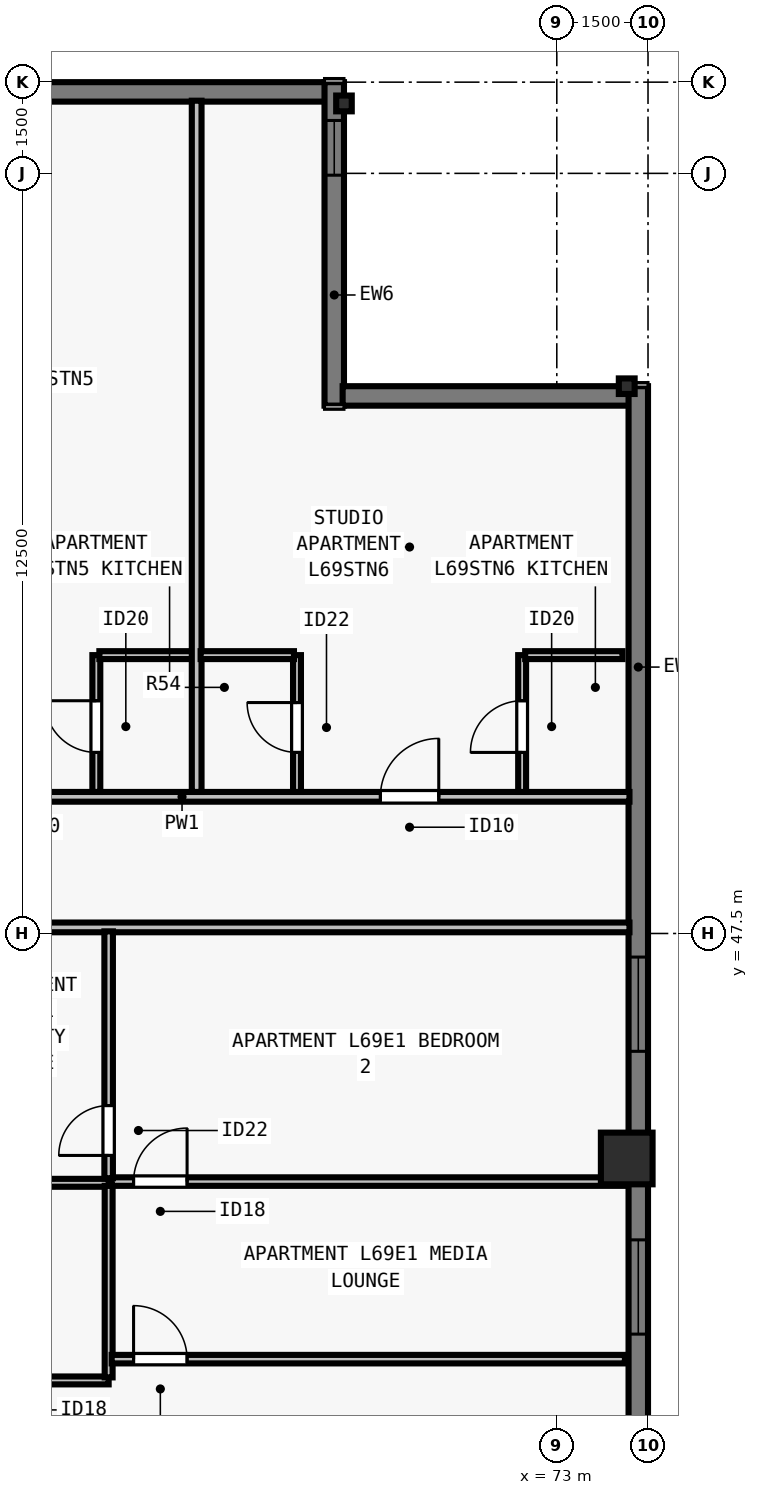
"""IFC4 building model, lengths in metres.
Left out: names, types, materials, properties, quantities, classifications, styles, units other than length and angle.
Written with IfcOpenShell. Run it as: python <this file> out.ifc"""

import sys

from ifc_helpers import new_model, si_unit, direction, frame, frame_2d, origin, origin_2d, place, context, subcontext, project, spatial, rectangle, i_section, extrude, element, fill, save


model = new_model("IFC4")
c1 = context("Model", 3, precision=1e-05, world=origin(), true_north=direction((0.0, 1.0)))
c2 = subcontext(c1, "Body", "Model", "MODEL_VIEW")
j1 = project(units=[si_unit("LENGTHUNIT", "METRE"), si_unit("PLANEANGLEUNIT", "RADIAN")], contexts=[c1])
p1 = place(None, origin())
s1 = spatial("IfcSite", under=j1, at=p1, CompositionType="ELEMENT")
p2 = place(p1, origin())
s2 = spatial("IfcBuilding", under=s1, at=p2, CompositionType="ELEMENT")
p3 = place(p2, frame((0.0, 0.0, 251.5)))
s3 = spatial("IfcBuildingStorey", under=s2, at=p3, CompositionType="ELEMENT", Elevation=251.5)
p4 = place(p3, frame((74.15, 43.8, 0.0), z_axis=(0.0, 0.0, 1.0), x_axis=(0.0, 1.0, 0.0)))
e1 = element("IfcColumn", 1, at=p4, inside=s3, PredefinedType="COLUMN", context=c2, shape_type="SweptSolid", body=[
    extrude(rectangle(XDim=0.85, YDim=0.85, at=origin_2d()), origin(), (0.0, 0.0, 1.0), 3.5),
])
for number, where, z_axis, x_axis in (
    (2, (74.15, 56.5, 0.0), (0.0, 0.0, 1.0), (0.0, 1.0, 0.0)),
    (3, (69.5, 61.15, 0.0), (0.0, 0.0, 1.0), (1.0, 0.0, 0.0)),
):
    element("IfcColumn", number, at=place(p3, frame(where, z_axis=z_axis, x_axis=x_axis)), inside=s3, PredefinedType="COLUMN", context=c2, shape_type="SweptSolid", body=[
        extrude(i_section(OverallWidth=0.256, OverallDepth=0.26, WebThickness=0.01, FlangeThickness=0.017, FilletRadius=0.013, at=origin_2d()), origin(), (0.0, 0.0, 1.0), 3.5),
    ])
p5 = place(p3, frame((34.5, 61.34, 0.0), z_axis=(0.0, 0.0, 1.0), x_axis=(1.0, 0.0, 0.0)))
e4 = element("IfcWall", 4, at=p5, inside=s3, PredefinedType="SOLIDWALL", context=c2, shape_type="SweptSolid", body=[
    extrude(rectangle(XDim=34.702, YDim=0.32, at=frame_2d((17.351, 0.0))), origin(), (0.0, 0.0, 1.0), 3.29),
])
p6 = place(p5, frame((4.613, 0.0, 0.8)))
e5 = element("IfcOpeningElement", 5, at=p6, cuts=e4, PredefinedType="OPENING", context=c2, shape_type="SweptSolid", body=[
    extrude(rectangle(XDim=1.85, YDim=1.678, at=frame_2d((0.925, 0.839))), frame((0.0, 0.17, 0.0), z_axis=(0.0, -1.0, 0.0), x_axis=(1.0, 0.0, 0.0)), (0.0, 0.0, 1.0), 0.34),
])
p7 = place(p5, frame((7.688, 0.0, 0.8)))
e6 = element("IfcOpeningElement", 6, at=p7, cuts=e4, PredefinedType="OPENING", context=c2, shape_type="SweptSolid", body=[
    extrude(rectangle(XDim=1.55, YDim=1.678, at=frame_2d((0.775, 0.839))), frame((0.0, 0.17, 0.0), z_axis=(0.0, -1.0, 0.0), x_axis=(1.0, 0.0, 0.0)), (0.0, 0.0, 1.0), 0.34),
])
p8 = place(p5, frame((14.888, 0.0, 0.8)))
e7 = element("IfcOpeningElement", 7, at=p8, cuts=e4, PredefinedType="OPENING", context=c2, shape_type="SweptSolid", body=[
    extrude(rectangle(XDim=1.55, YDim=1.678, at=frame_2d((0.775, 0.839))), frame((0.0, 0.17, 0.0), z_axis=(0.0, -1.0, 0.0), x_axis=(1.0, 0.0, 0.0)), (0.0, 0.0, 1.0), 0.34),
])
p9 = place(p5, frame((18.564, 0.0, 0.8)))
e8 = element("IfcOpeningElement", 8, at=p9, cuts=e4, PredefinedType="OPENING", context=c2, shape_type="SweptSolid", body=[
    extrude(rectangle(XDim=1.85, YDim=1.678, at=frame_2d((0.925, 0.839))), frame((0.0, 0.17, 0.0), z_axis=(0.0, -1.0, 0.0), x_axis=(1.0, 0.0, 0.0)), (0.0, 0.0, 1.0), 0.34),
])
p10 = place(p5, frame((25.314, 0.0, 0.8)))
e9 = element("IfcOpeningElement", 9, at=p10, cuts=e4, PredefinedType="OPENING", context=c2, shape_type="SweptSolid", body=[
    extrude(rectangle(XDim=1.85, YDim=1.678, at=frame_2d((0.925, 0.839))), frame((0.0, 0.17, 0.0), z_axis=(0.0, -1.0, 0.0), x_axis=(1.0, 0.0, 0.0)), (0.0, 0.0, 1.0), 0.34),
])
p11 = place(p5, frame((28.389, 0.0, 0.8)))
e10 = element("IfcOpeningElement", 10, at=p11, cuts=e4, PredefinedType="OPENING", context=c2, shape_type="SweptSolid", body=[
    extrude(rectangle(XDim=1.55, YDim=1.678, at=frame_2d((0.775, 0.839))), frame((0.0, 0.17, 0.0), z_axis=(0.0, -1.0, 0.0), x_axis=(1.0, 0.0, 0.0)), (0.0, 0.0, 1.0), 0.34),
])
p12 = place(p3, frame((69.34, 61.5, 0.0), z_axis=(0.0, 0.0, 1.0), x_axis=(0.0, -1.0, 0.0)))
e11 = element("IfcWall", 11, at=p12, inside=s3, PredefinedType="SOLIDWALL", context=c2, shape_type="SweptSolid", body=[
    extrude(rectangle(XDim=5.32, YDim=0.32, at=frame_2d((2.66, 0.0))), origin(), (0.0, 0.0, 1.0), 3.29),
])
p13 = place(p12, frame((0.63, 0.0, 0.8)))
e12 = element("IfcOpeningElement", 12, at=p13, cuts=e11, PredefinedType="OPENING", context=c2, shape_type="SweptSolid", body=[
    extrude(rectangle(XDim=0.9, YDim=1.678, at=frame_2d((0.45, 0.839))), frame((0.0, 0.17, 0.0), z_axis=(0.0, -1.0, 0.0), x_axis=(1.0, 0.0, 0.0)), (0.0, 0.0, 1.0), 0.34),
])
p14 = place(p3, frame((69.478, 56.34, 0.0), z_axis=(0.0, 0.0, 1.0), x_axis=(1.0, 0.0, 0.0)))
e13 = element("IfcWall", 13, at=p14, inside=s3, PredefinedType="SOLIDWALL", context=c2, shape_type="SweptSolid", body=[
    extrude(rectangle(XDim=4.724, YDim=0.32, at=frame_2d((2.362, 0.0))), origin(), (0.0, 0.0, 1.0), 3.29),
])
p15 = place(p3, frame((74.34, 56.5, 0.0), z_axis=(0.0, 0.0, 1.0), x_axis=(0.0, -1.0, 0.0)))
e14 = element("IfcWall", 14, at=p15, inside=s3, PredefinedType="SOLIDWALL", context=c2, shape_type="SweptSolid", body=[
    extrude(rectangle(XDim=34.702, YDim=0.32, at=frame_2d((17.351, 0.0))), origin(), (0.0, 0.0, 1.0), 3.29),
])
p16 = place(p15, frame((9.388, 0.0, 0.8)))
e15 = element("IfcOpeningElement", 15, at=p16, cuts=e14, PredefinedType="OPENING", context=c2, shape_type="SweptSolid", body=[
    extrude(rectangle(XDim=1.55, YDim=1.678, at=frame_2d((0.775, 0.839))), frame((0.0, 0.17, 0.0), z_axis=(0.0, -1.0, 0.0), x_axis=(1.0, 0.0, 0.0)), (0.0, 0.0, 1.0), 0.34),
])
p17 = place(p15, frame((14.038, 0.0, 0.8)))
e16 = element("IfcOpeningElement", 16, at=p17, cuts=e14, PredefinedType="OPENING", context=c2, shape_type="SweptSolid", body=[
    extrude(rectangle(XDim=1.55, YDim=1.678, at=frame_2d((0.775, 0.839))), frame((0.0, 0.17, 0.0), z_axis=(0.0, -1.0, 0.0), x_axis=(1.0, 0.0, 0.0)), (0.0, 0.0, 1.0), 0.34),
])
p18 = place(p15, frame((18.114, 0.0, 0.8)))
e17 = element("IfcOpeningElement", 17, at=p18, cuts=e14, PredefinedType="OPENING", context=c2, shape_type="SweptSolid", body=[
    extrude(rectangle(XDim=1.85, YDim=1.678, at=frame_2d((0.925, 0.839))), frame((0.0, 0.17, 0.0), z_axis=(0.0, -1.0, 0.0), x_axis=(1.0, 0.0, 0.0)), (0.0, 0.0, 1.0), 0.34),
])
p19 = place(p15, frame((23.614, 0.0, 0.8)))
e18 = element("IfcOpeningElement", 18, at=p19, cuts=e14, PredefinedType="OPENING", context=c2, shape_type="SweptSolid", body=[
    extrude(rectangle(XDim=1.85, YDim=1.678, at=frame_2d((0.925, 0.839))), frame((0.0, 0.17, 0.0), z_axis=(0.0, -1.0, 0.0), x_axis=(1.0, 0.0, 0.0)), (0.0, 0.0, 1.0), 0.34),
])
p20 = place(p15, frame((30.95, 0.0, 0.8)))
e19 = element("IfcOpeningElement", 19, at=p20, cuts=e14, PredefinedType="OPENING", context=c2, shape_type="SweptSolid", body=[
    extrude(rectangle(XDim=0.9, YDim=1.678, at=frame_2d((0.45, 0.839))), frame((0.0, 0.17, 0.0), z_axis=(0.0, -1.0, 0.0), x_axis=(1.0, 0.0, 0.0)), (0.0, 0.0, 1.0), 0.34),
])
p21 = place(p3, frame((29.805, 49.748, 0.0), z_axis=(0.0, 0.0, 1.0), x_axis=(1.0, 0.0, 0.0)))
e20 = element("IfcWall", 20, at=p21, inside=s3, PredefinedType="PARTITIONING", context=c2, shape_type="SweptSolid", body=[
    extrude(rectangle(XDim=44.39, YDim=0.16, at=frame_2d((22.195, 0.0))), origin(), (0.0, 0.0, 1.0), 2.958),
])
p22 = place(p21, frame((3.494, 0.0, 0.0)))
e21 = element("IfcOpeningElement", 21, at=p22, cuts=e20, PredefinedType="OPENING", context=c2, shape_type="SweptSolid", body=[
    extrude(rectangle(XDim=0.96, YDim=2.18, at=frame_2d((0.48, 1.09))), frame((0.0, 0.09, 0.0), z_axis=(0.0, -1.0, 0.0), x_axis=(1.0, 0.0, 0.0)), (0.0, 0.0, 1.0), 0.18),
])
p23 = place(p21, frame((10.73, 0.0, 0.0)))
e22 = element("IfcOpeningElement", 22, at=p23, cuts=e20, PredefinedType="OPENING", context=c2, shape_type="SweptSolid", body=[
    extrude(rectangle(XDim=0.96, YDim=2.18, at=frame_2d((0.48, 1.09))), frame((0.0, 0.09, 0.0), z_axis=(0.0, -1.0, 0.0), x_axis=(1.0, 0.0, 0.0)), (0.0, 0.0, 1.0), 0.18),
])
p24 = place(p21, frame((18.09, 0.0, 0.0)))
e23 = element("IfcOpeningElement", 23, at=p24, cuts=e20, PredefinedType="OPENING", context=c2, shape_type="SweptSolid", body=[
    extrude(rectangle(XDim=0.96, YDim=2.18, at=frame_2d((0.48, 1.09))), frame((0.0, 0.09, 0.0), z_axis=(0.0, -1.0, 0.0), x_axis=(1.0, 0.0, 0.0)), (0.0, 0.0, 1.0), 0.18),
])
p25 = place(p21, frame((25.45, 0.0, 0.0)))
e24 = element("IfcOpeningElement", 24, at=p25, cuts=e20, PredefinedType="OPENING", context=c2, shape_type="SweptSolid", body=[
    extrude(rectangle(XDim=0.96, YDim=2.18, at=frame_2d((0.48, 1.09))), frame((0.0, 0.09, 0.0), z_axis=(0.0, -1.0, 0.0), x_axis=(1.0, 0.0, 0.0)), (0.0, 0.0, 1.0), 0.18),
])
p26 = place(p21, frame((32.81, 0.0, 0.0)))
e25 = element("IfcOpeningElement", 25, at=p26, cuts=e20, PredefinedType="OPENING", context=c2, shape_type="SweptSolid", body=[
    extrude(rectangle(XDim=0.96, YDim=2.18, at=frame_2d((0.48, 1.09))), frame((0.0, 0.09, 0.0), z_axis=(0.0, -1.0, 0.0), x_axis=(1.0, 0.0, 0.0)), (0.0, 0.0, 1.0), 0.18),
])
p27 = place(p21, frame((40.294, 0.0, 0.0)))
e26 = element("IfcOpeningElement", 26, at=p27, cuts=e20, PredefinedType="OPENING", context=c2, shape_type="SweptSolid", body=[
    extrude(rectangle(XDim=0.96, YDim=2.18, at=frame_2d((0.48, 1.09))), frame((0.0, 0.09, 0.0), z_axis=(0.0, -1.0, 0.0), x_axis=(1.0, 0.0, 0.0)), (0.0, 0.0, 1.0), 0.18),
])
p28 = place(p3, frame((62.865, 47.6, 0.0), z_axis=(0.0, 0.0, 1.0), x_axis=(1.0, 0.0, 0.0)))
e27 = element("IfcWall", 27, at=p28, inside=s3, PredefinedType="PARTITIONING", context=c2, shape_type="SweptSolid", body=[
    extrude(rectangle(XDim=11.33, YDim=0.16, at=frame_2d((5.665, 0.0))), origin(), (0.0, 0.0, 1.0), 3.29),
])
p29 = place(p3, frame((65.427, 49.827, 0.0), z_axis=(0.0, 0.0, 1.0), x_axis=(0.0, 1.0, 0.0)))
e28 = element("IfcWall", 28, at=p29, inside=s3, PredefinedType="PLUMBINGWALL", context=c2, shape_type="SweptSolid", body=[
    extrude(rectangle(XDim=2.25, YDim=0.13, at=frame_2d((1.125, 0.0))), origin(), (0.0, 0.0, 1.0), 3.29),
])
p30 = place(p29, frame((0.65, 0.0, 0.0)))
e29 = element("IfcOpeningElement", 29, at=p30, cuts=e28, PredefinedType="OPENING", context=c2, shape_type="SweptSolid", body=[
    extrude(rectangle(XDim=0.85, YDim=2.1, at=frame_2d((0.425, 1.05))), frame((0.0, 0.075, 0.0), z_axis=(0.0, -1.0, 0.0), x_axis=(1.0, 0.0, 0.0)), (0.0, 0.0, 1.0), 0.15),
])
p31 = place(p3, frame((65.478, 52.077, 0.0), z_axis=(0.0, 0.0, 1.0), x_axis=(1.0, 0.0, 0.0)))
e30 = element("IfcWall", 30, at=p31, inside=s3, PredefinedType="PLUMBINGWALL", context=c2, shape_type="SweptSolid", body=[
    extrude(rectangle(XDim=1.6, YDim=0.13, at=frame_2d((0.8, 0.0))), origin(), (0.0, 0.0, 1.0), 3.29),
])
p32 = place(p3, frame((67.077, 49.827, 0.0), z_axis=(0.0, 0.0, 1.0), x_axis=(0.0, 1.0, 0.0)))
e31 = element("IfcWall", 31, at=p32, inside=s3, PredefinedType="PARTITIONING", context=c2, shape_type="SweptSolid", body=[
    extrude(rectangle(XDim=11.368, YDim=0.16, at=frame_2d((5.684, 0.0))), origin(), (0.0, 0.0, 1.0), 2.573),
])
p33 = place(p3, frame((68.728, 49.827, 0.0), z_axis=(0.0, 0.0, 1.0), x_axis=(0.0, 1.0, 0.0)))
e32 = element("IfcWall", 32, at=p33, inside=s3, PredefinedType="PLUMBINGWALL", context=c2, shape_type="SweptSolid", body=[
    extrude(rectangle(XDim=2.25, YDim=0.13, at=frame_2d((1.125, 0.0))), origin(), (0.0, 0.0, 1.0), 3.29),
])
p34 = place(p33, frame((0.65, 0.0, 0.0)))
e33 = element("IfcOpeningElement", 33, at=p34, cuts=e32, PredefinedType="OPENING", context=c2, shape_type="SweptSolid", body=[
    extrude(rectangle(XDim=0.82, YDim=2.1, at=frame_2d((0.41, 1.05))), frame((0.0, 0.075, 0.0), z_axis=(0.0, -1.0, 0.0), x_axis=(1.0, 0.0, 0.0)), (0.0, 0.0, 1.0), 0.15),
])
p35 = place(p3, frame((67.143, 52.077, 0.0), z_axis=(0.0, 0.0, 1.0), x_axis=(1.0, 0.0, 0.0)))
e34 = element("IfcWall", 34, at=p35, inside=s3, PredefinedType="PLUMBINGWALL", context=c2, shape_type="SweptSolid", body=[
    extrude(rectangle(XDim=1.535, YDim=0.13, at=frame_2d((0.768, 0.0))), origin(), (0.0, 0.0, 1.0), 2.958),
])
p36 = place(p3, frame((72.43, 49.827, 0.0), z_axis=(0.0, 0.0, 1.0), x_axis=(0.0, 1.0, 0.0)))
e35 = element("IfcWall", 35, at=p36, inside=s3, PredefinedType="PLUMBINGWALL", context=c2, shape_type="SweptSolid", body=[
    extrude(rectangle(XDim=2.25, YDim=0.13, at=frame_2d((1.125, 0.0))), origin(), (0.0, 0.0, 1.0), 3.29),
])
p37 = place(p36, frame((0.65, 0.0, 0.0)))
e36 = element("IfcOpeningElement", 36, at=p37, cuts=e35, PredefinedType="OPENING", context=c2, shape_type="SweptSolid", body=[
    extrude(rectangle(XDim=0.85, YDim=2.1, at=frame_2d((0.425, 1.05))), frame((0.0, 0.075, 0.0), z_axis=(0.0, -1.0, 0.0), x_axis=(1.0, 0.0, 0.0)), (0.0, 0.0, 1.0), 0.15),
])
p38 = place(p3, frame((72.48, 52.077, 0.0), z_axis=(0.0, 0.0, 1.0), x_axis=(1.0, 0.0, 0.0)))
e37 = element("IfcWall", 37, at=p38, inside=s3, PredefinedType="PLUMBINGWALL", context=c2, shape_type="SweptSolid", body=[
    extrude(rectangle(XDim=1.6, YDim=0.13, at=frame_2d((0.8, 0.0))), origin(), (0.0, 0.0, 1.0), 3.29),
])
p39 = place(p3, frame((62.88, 43.4, 0.0), z_axis=(0.0, 0.0, 1.0), x_axis=(1.0, 0.0, 0.0)))
e38 = element("IfcWall", 38, at=p39, inside=s3, PredefinedType="PLUMBINGWALL", context=c2, shape_type="SweptSolid", body=[
    extrude(rectangle(XDim=2.75, YDim=0.13, at=frame_2d((1.375, 0.0))), origin(), (0.0, 0.0, 1.0), 3.29),
])
p40 = place(p3, frame((62.88, 40.15, 0.0), z_axis=(0.0, 0.0, 1.0), x_axis=(1.0, 0.0, 0.0)))
e39 = element("IfcWall", 39, at=p40, inside=s3, PredefinedType="PLUMBINGWALL", context=c2, shape_type="SweptSolid", body=[
    extrude(rectangle(XDim=2.75, YDim=0.13, at=frame_2d((1.375, 0.0))), origin(), (0.0, 0.0, 1.0), 3.29),
])
p41 = place(p40, frame((0.55, 0.0, 0.0)))
e40 = element("IfcOpeningElement", 40, at=p41, cuts=e39, PredefinedType="OPENING", context=c2, shape_type="SweptSolid", body=[
    extrude(rectangle(XDim=0.88, YDim=2.1, at=frame_2d((0.44, 1.05))), frame((0.0, 0.075, 0.0), z_axis=(0.0, -1.0, 0.0), x_axis=(1.0, 0.0, 0.0)), (0.0, 0.0, 1.0), 0.15),
])
p42 = place(p3, frame((65.63, 40.2, 0.0), z_axis=(0.0, 0.0, 1.0), x_axis=(0.0, 1.0, 0.0)))
e41 = element("IfcWall", 41, at=p42, inside=s3, PredefinedType="PLUMBINGWALL", context=c2, shape_type="SweptSolid", body=[
    extrude(rectangle(XDim=3.15, YDim=0.13, at=frame_2d((1.575, 0.0))), origin(), (0.0, 0.0, 1.0), 3.29),
])
p43 = place(p3, frame((65.68, 43.42, 0.0), z_axis=(0.0, 0.0, 1.0), x_axis=(1.0, 0.0, 0.0)))
e42 = element("IfcWall", 42, at=p43, inside=s3, PredefinedType="PARTITIONING", context=c2, shape_type="SweptSolid", body=[
    extrude(rectangle(XDim=8.44, YDim=0.14, at=frame_2d((4.22, 0.0))), origin(), (0.0, 0.0, 1.0), 3.29),
])
p44 = place(p43, frame((0.36, 0.0, 0.0)))
e43 = element("IfcOpeningElement", 43, at=p44, cuts=e42, PredefinedType="OPENING", context=c2, shape_type="SweptSolid", body=[
    extrude(rectangle(XDim=0.88, YDim=2.1, at=frame_2d((0.44, 1.05))), frame((0.0, 0.08, 0.0), z_axis=(0.0, -1.0, 0.0), x_axis=(1.0, 0.0, 0.0)), (0.0, 0.0, 1.0), 0.16),
])
p45 = place(p3, frame((65.63, 43.475, 0.0), z_axis=(0.0, 0.0, 1.0), x_axis=(0.0, 1.0, 0.0)))
e44 = element("IfcWall", 44, at=p45, inside=s3, PredefinedType="PARTITIONING", context=c2, shape_type="SweptSolid", body=[
    extrude(rectangle(XDim=4.06, YDim=0.14, at=frame_2d((2.03, 0.0))), origin(), (0.0, 0.0, 1.0), 3.29),
])
p46 = place(p45, frame((0.375, 0.0, 0.0)))
e45 = element("IfcOpeningElement", 45, at=p46, cuts=e44, PredefinedType="OPENING", context=c2, shape_type="SweptSolid", body=[
    extrude(rectangle(XDim=0.82, YDim=2.1, at=frame_2d((0.41, 1.05))), frame((0.0, 0.08, 0.0), z_axis=(0.0, -1.0, 0.0), x_axis=(1.0, 0.0, 0.0)), (0.0, 0.0, 1.0), 0.16),
])
p47 = place(p3, frame((65.68, 40.5, 0.0), z_axis=(0.0, 0.0, 1.0), x_axis=(1.0, 0.0, 0.0)))
e46 = element("IfcWall", 46, at=p47, inside=s3, PredefinedType="PARTITIONING", context=c2, shape_type="SweptSolid", body=[
    extrude(rectangle(XDim=8.44, YDim=0.14, at=frame_2d((4.22, 0.0))), origin(), (0.0, 0.0, 1.0), 3.29),
])
p48 = place(p47, frame((0.36, 0.0, 0.0)))
e47 = element("IfcOpeningElement", 47, at=p48, cuts=e46, PredefinedType="OPENING", context=c2, shape_type="SweptSolid", body=[
    extrude(rectangle(XDim=0.88, YDim=2.1, at=frame_2d((0.44, 1.05))), frame((0.0, 0.08, 0.0), z_axis=(0.0, -1.0, 0.0), x_axis=(1.0, 0.0, 0.0)), (0.0, 0.0, 1.0), 0.16),
])
p49 = place(p16, origin())
e48 = element("IfcWindow", 48, at=p49, inside=s3, PartitioningType="SINGLE_PANEL", PredefinedType="WINDOW", context=c2, shape_type="SweptSolid", body=[
    extrude(rectangle(XDim=1.55, YDim=1.678, at=frame_2d((0.775, 0.839))), frame((0.0, -0.05, 0.0), z_axis=(0.0, -1.0, 0.0), x_axis=(1.0, 0.0, 0.0)), (0.0, 0.0, 1.0), 0.06),
])
fill(e15, e48)
p50 = place(p17, origin())
e49 = element("IfcWindow", 49, at=p50, inside=s3, PartitioningType="SINGLE_PANEL", PredefinedType="WINDOW", context=c2, shape_type="SweptSolid", body=[
    extrude(rectangle(XDim=1.55, YDim=1.678, at=frame_2d((0.775, 0.839))), frame((0.0, -0.05, 0.0), z_axis=(0.0, -1.0, 0.0), x_axis=(1.0, 0.0, 0.0)), (0.0, 0.0, 1.0), 0.06),
])
fill(e16, e49)
p51 = place(p13, origin())
e50 = element("IfcWindow", 50, at=p51, inside=s3, PartitioningType="SINGLE_PANEL", PredefinedType="WINDOW", context=c2, shape_type="SweptSolid", body=[
    extrude(rectangle(XDim=0.9, YDim=1.678, at=frame_2d((0.45, 0.839))), frame((0.0, -0.04, 0.0), z_axis=(0.0, -1.0, 0.0), x_axis=(1.0, 0.0, 0.0)), (0.0, 0.0, 1.0), 0.06),
])
fill(e12, e50)
p52 = place(p30, origin())
e51 = element("IfcDoor", 51, at=p52, inside=s3, OperationType="SINGLE_SWING_RIGHT", PredefinedType="DOOR", context=c2, shape_type="SweptSolid", body=[
    extrude(rectangle(XDim=0.85, YDim=2.1, at=frame_2d((0.425, 1.05))), frame((0.0, 0.025, 0.0), z_axis=(0.0, -1.0, 0.0), x_axis=(1.0, 0.0, 0.0)), (0.0, 0.0, 1.0), 0.05),
])
fill(e29, e51)
p53 = place(p34, origin())
e52 = element("IfcDoor", 52, at=p53, inside=s3, OperationType="SINGLE_SWING_RIGHT", PredefinedType="DOOR", context=c2, shape_type="SweptSolid", body=[
    extrude(rectangle(XDim=0.82, YDim=2.1, at=frame_2d((0.41, 1.05))), frame((0.0, 0.025, 0.0), z_axis=(0.0, -1.0, 0.0), x_axis=(1.0, 0.0, 0.0)), (0.0, 0.0, 1.0), 0.05),
])
fill(e33, e52)
p54 = place(p37, origin())
e53 = element("IfcDoor", 53, at=p54, inside=s3, OperationType="SINGLE_SWING_LEFT", PredefinedType="DOOR", context=c2, shape_type="SweptSolid", body=[
    extrude(rectangle(XDim=0.85, YDim=2.1, at=frame_2d((0.425, 1.05))), frame((0.0, 0.025, 0.0), z_axis=(0.0, -1.0, 0.0), x_axis=(1.0, 0.0, 0.0)), (0.0, 0.0, 1.0), 0.05),
])
fill(e36, e53)
p55 = place(p27, origin())
e54 = element("IfcDoor", 54, at=p55, inside=s3, OperationType="SINGLE_SWING_RIGHT", PredefinedType="DOOR", context=c2, shape_type="SweptSolid", body=[
    extrude(rectangle(XDim=0.96, YDim=2.18, at=frame_2d((0.48, 1.09))), frame((0.0, 0.025, 0.0), z_axis=(0.0, -1.0, 0.0), x_axis=(1.0, 0.0, 0.0)), (0.0, 0.0, 1.0), 0.05),
])
fill(e26, e54)
p56 = place(p46, origin())
e55 = element("IfcDoor", 55, at=p56, inside=s3, OperationType="SINGLE_SWING_LEFT", PredefinedType="DOOR", context=c2, shape_type="SweptSolid", body=[
    extrude(rectangle(XDim=0.82, YDim=2.1, at=frame_2d((0.41, 1.05))), frame((0.0, 0.025, 0.0), z_axis=(0.0, -1.0, 0.0), x_axis=(1.0, 0.0, 0.0)), (0.0, 0.0, 1.0), 0.05),
])
fill(e45, e55)
p57 = place(p44, origin())
e56 = element("IfcDoor", 56, at=p57, inside=s3, OperationType="SINGLE_SWING_RIGHT", PredefinedType="DOOR", context=c2, shape_type="SweptSolid", body=[
    extrude(rectangle(XDim=0.88, YDim=2.1, at=frame_2d((0.44, 1.05))), frame((0.0, 0.025, 0.0), z_axis=(0.0, -1.0, 0.0), x_axis=(1.0, 0.0, 0.0)), (0.0, 0.0, 1.0), 0.05),
])
fill(e43, e56)
p58 = place(p48, origin())
e57 = element("IfcDoor", 57, at=p58, inside=s3, OperationType="SINGLE_SWING_LEFT", PredefinedType="DOOR", context=c2, shape_type="SweptSolid", body=[
    extrude(rectangle(XDim=0.88, YDim=2.1, at=frame_2d((0.44, 1.05))), frame((0.0, 0.025, 0.0), z_axis=(0.0, -1.0, 0.0), x_axis=(1.0, 0.0, 0.0)), (0.0, 0.0, 1.0), 0.05),
])
fill(e47, e57)
save(model, sys.argv[1])
